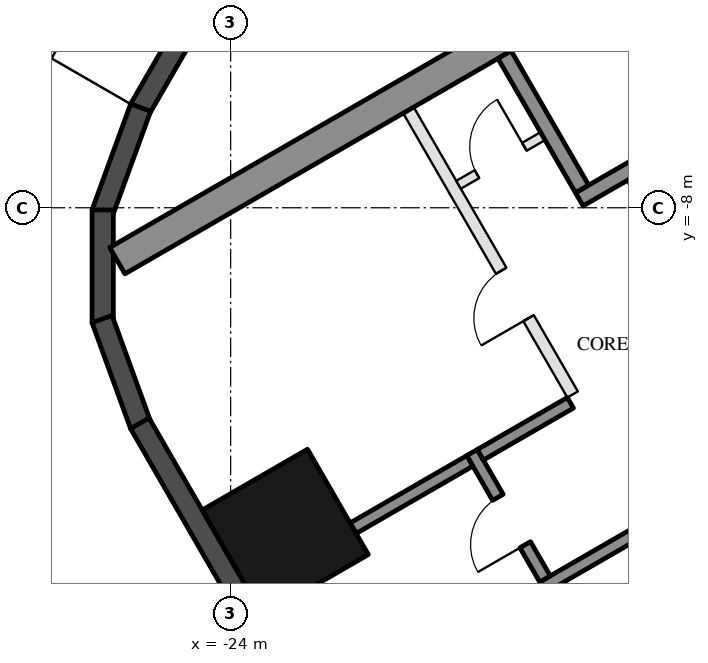
"""IFC4 building model, lengths in metres.
Left out: names, types, materials, properties, quantities, classifications, styles, units other than length and angle.
Written with IfcOpenShell. Run it as: python <this file> out.ifc"""

import sys

from ifc_helpers import new_model, si_unit, direction, frame, frame_2d, origin, origin_2d, place, context, subcontext, project, spatial, rectangle, hollow_rectangle, extrude, boolean, halfspace, element, fill, save


model = new_model("IFC4")
c1 = context("Model", 3, precision=1e-05, world=origin(), true_north=direction((0.0, 1.0)))
c2 = subcontext(c1, "Body", "Model", "MODEL_VIEW")
j1 = project(units=[si_unit("LENGTHUNIT", "METRE"), si_unit("PLANEANGLEUNIT", "RADIAN")], contexts=[c1])
p1 = place(None, origin())
s1 = spatial("IfcSite", under=j1, at=p1, CompositionType="ELEMENT")
p2 = place(p1, origin())
s2 = spatial("IfcBuilding", under=s1, at=p2, CompositionType="ELEMENT")
p3 = place(p2, frame((0.0, 0.0, 257.8)))
s3 = spatial("IfcBuildingStorey", under=s2, at=p3, CompositionType="ELEMENT", Elevation=257.8)
p4 = place(p3, frame((-23.102, -13.338, 0.0), z_axis=(0.0, 0.0, 1.0), x_axis=(-0.5, 0.866025403784, 0.0)))
e1 = element("IfcColumn", 1, at=p4, inside=s3, PredefinedType="COLUMN", context=c2, shape_type="SweptSolid", body=[
    boolean("DIFFERENCE", extrude(hollow_rectangle(XDim=2.0, YDim=2.0, WallThickness=0.05, at=origin_2d()), origin(), (0.0, 0.0, 1.0), 3.7), halfspace(frame((0.0, 0.0, 0.112), z_axis=(0.0, 0.0, 1.0), x_axis=(1.0, 0.0, 0.0)), True)),
])
p5 = place(p3, frame((-23.579, -3.065, 0.0), z_axis=(0.0, 0.0, 1.0), x_axis=(-0.500048109927, -0.865997625723, 0.0)))
e2 = element("IfcWall", 2, at=p5, inside=s3, PredefinedType="SOLIDWALL", context=c2, shape_type="SweptSolid", body=[
    extrude(rectangle(XDim=3.829, YDim=0.35, at=frame_2d((1.914, 0.0))), origin(), (0.0, 0.0, 1.0), 3.55),
])
p6 = place(p5, frame((1.575, 0.0, 0.3)))
e3 = element("IfcOpeningElement", 3, at=p6, cuts=e2, PredefinedType="OPENING", context=c2, shape_type="SweptSolid", body=[
    extrude(rectangle(XDim=0.8, YDim=2.65, at=frame_2d((0.4, 1.325))), frame((0.0, 0.185, 0.0), z_axis=(0.0, -1.0, 0.0), x_axis=(1.0, 0.0, 0.0)), (0.0, 0.0, 1.0), 0.37),
])
for number, where, z_axis, x_axis in (
    (4, (-25.481, -6.353, 0.0), (0.0, 0.0, 1.0), (-0.342, -0.94, 0.0)),
    (5, (-26.104, -8.036, 0.0), (0.0, 0.0, 1.0), (0.0, -1.0, 0.0)),
):
    element("IfcWall", number, at=place(p3, frame(where, z_axis=z_axis, x_axis=x_axis)), inside=s3, PredefinedType="SOLIDWALL", context=c2, shape_type="SweptSolid", body=[
        extrude(rectangle(XDim=1.855, YDim=0.35, at=frame_2d((0.927, 0.0))), origin(), (0.0, 0.0, 1.0), 3.55),
    ])
p7 = place(p3, frame((-26.115, -9.831, 0.0), z_axis=(0.0, 0.0, 1.0), x_axis=(0.341890986265, -0.93973962006, 0.0)))
e6 = element("IfcWall", 6, at=p7, inside=s3, PredefinedType="SOLIDWALL", context=c2, shape_type="SweptSolid", body=[
    extrude(rectangle(XDim=1.855, YDim=0.35, at=frame_2d((0.928, 0.0))), origin(), (0.0, 0.0, 1.0), 3.55),
])
p8 = place(p3, frame((-25.494, -11.546, 0.0), z_axis=(0.0, 0.0, 1.0), x_axis=(0.500028854569, -0.86600874395, 0.0)))
e7 = element("IfcWall", 7, at=p8, inside=s3, PredefinedType="SOLIDWALL", context=c2, shape_type="SweptSolid", body=[
    extrude(rectangle(XDim=5.495, YDim=0.35, at=frame_2d((2.748, 0.0))), origin(), (0.0, 0.0, 1.0), 3.55),
])
for number, where, z_axis, x_axis in (
    (8, (-13.797, -1.903, 0.0), (0.0, 0.0, 1.0), (-0.866, -0.5, 0.0)),
    (9, (-8.547, -10.997, 0.0), (0.0, 0.0, 1.0), (-0.866, -0.5, 0.0)),
):
    element("IfcWall", number, at=place(p3, frame(where, z_axis=z_axis, x_axis=x_axis)), inside=s3, PredefinedType="SHEAR", context=c2, shape_type="SweptSolid", body=[
        extrude(rectangle(XDim=13.934, YDim=0.5, at=frame_2d((6.967, 0.0))), origin(), (0.0, 0.0, 1.0), 3.5),
    ])
p9 = place(p3, frame((-12.681, -4.636, 0.0), z_axis=(0.0, 0.0, 1.0), x_axis=(-0.866021702275, -0.500006411147, 0.0)))
e10 = element("IfcWall", 10, at=p9, inside=s3, PredefinedType="SHEAR", context=c2, shape_type="SweptSolid", body=[
    extrude(rectangle(XDim=6.45, YDim=0.25, at=frame_2d((3.225, 0.0))), origin(), (0.0, 0.0, 1.0), 3.5),
])
p10 = place(p9, frame((0.3, 0.0, 0.0)))
e11 = element("IfcOpeningElement", 11, at=p10, cuts=e10, PredefinedType="OPENING", context=c2, shape_type="SweptSolid", body=[
    extrude(rectangle(XDim=1.0, YDim=2.1, at=frame_2d((0.5, 1.05))), frame((0.0, 0.135, 0.0), z_axis=(0.0, -1.0, 0.0), x_axis=(1.0, 0.0, 0.0)), (0.0, 0.0, 1.0), 0.27),
])
p11 = place(p3, frame((-19.496, -5.482, 0.0), z_axis=(0.0, 0.0, 1.0), x_axis=(0.499990435942, -0.866030925526, 0.0)))
e12 = element("IfcWall", 12, at=p11, inside=s3, PredefinedType="SHEAR", context=c2, shape_type="SweptSolid", body=[
    extrude(rectangle(XDim=2.55, YDim=0.25, at=frame_2d((1.275, 0.0))), origin(), (0.0, 0.0, 1.0), 3.5),
])
p12 = place(p3, frame((-17.381, -7.495, 0.0), z_axis=(0.0, 0.0, 1.0), x_axis=(0.500011755427, -0.866018616679, 0.0)))
e13 = element("IfcWall", 13, at=p12, inside=s3, PredefinedType="SHEAR", context=c2, shape_type="SweptSolid", body=[
    extrude(rectangle(XDim=2.8, YDim=0.2, at=frame_2d((1.4, 0.0))), origin(), (0.0, 0.0, 1.0), 3.5),
])
p13 = place(p3, frame((-10.068, -9.162, 0.0), z_axis=(0.0, 0.0, 1.0), x_axis=(-0.866032725843, -0.499987317609, 0.0)))
e14 = element("IfcWall", 14, at=p13, inside=s3, PredefinedType="SHEAR", context=c2, shape_type="SweptSolid", body=[
    extrude(rectangle(XDim=10.16, YDim=0.2, at=frame_2d((5.08, 0.0))), origin(), (0.0, 0.0, 1.0), 3.5),
])
p14 = place(p13, frame((4.53, 0.0, 0.0)))
e15 = element("IfcOpeningElement", 15, at=p14, cuts=e14, PredefinedType="OPENING", context=c2, shape_type="SweptSolid", body=[
    extrude(rectangle(XDim=0.9, YDim=2.1, at=frame_2d((0.45, 1.05))), frame((0.0, 0.11, 0.0), z_axis=(0.0, -1.0, 0.0), x_axis=(1.0, 0.0, 0.0)), (0.0, 0.0, 1.0), 0.22),
])
p15 = place(p3, frame((-20.031, -12.026, 0.0), z_axis=(0.0, 0.0, 1.0), x_axis=(0.500033551112, -0.866006032174, 0.0)))
e16 = element("IfcWall", 16, at=p15, inside=s3, PredefinedType="SHEAR", context=c2, shape_type="SweptSolid", body=[
    extrude(rectangle(XDim=2.4, YDim=0.2, at=frame_2d((1.2, 0.0))), origin(), (0.0, 0.0, 1.0), 3.5),
])
p16 = place(p15, frame((0.85, 0.0, 0.0)))
e17 = element("IfcOpeningElement", 17, at=p16, cuts=e16, PredefinedType="OPENING", context=c2, shape_type="SweptSolid", body=[
    extrude(rectangle(XDim=0.9, YDim=2.1, at=frame_2d((0.45, 1.05))), frame((0.0, 0.11, 0.0), z_axis=(0.0, -1.0, 0.0), x_axis=(1.0, 0.0, 0.0)), (0.0, 0.0, 1.0), 0.22),
])
p17 = place(p3, frame((-18.413, -11.208, 0.0), z_axis=(0.0, 0.0, 1.0), x_axis=(-0.866038183914, -0.499977863513, 0.0)))
e18 = element("IfcWall", 18, at=p17, inside=s3, PredefinedType="SHEAR", context=c2, shape_type="SweptSolid", body=[
    extrude(rectangle(XDim=1.71, YDim=0.2, at=frame_2d((0.855, 0.0))), origin(), (0.0, 0.0, 1.0), 3.5),
])
p18 = place(p3, frame((-20.067, -12.163, 0.0), z_axis=(0.0, 0.0, 1.0), x_axis=(-0.866079196458, -0.49990681678, 0.0)))
e19 = element("IfcWall", 19, at=p18, inside=s3, PredefinedType="SHEAR", context=c2, shape_type="SweptSolid", body=[
    extrude(rectangle(XDim=2.216, YDim=0.2, at=frame_2d((1.108, 0.0))), origin(), (0.0, 0.0, 1.0), 3.5),
])
p19 = place(p3, frame((-21.076, -6.395, 0.0), z_axis=(0.0, 0.0, 1.0), x_axis=(0.50001468107, -0.866016927499, 0.0)))
e20 = element("IfcWall", 20, at=p19, inside=s3, PredefinedType="PARTITIONING", context=c2, shape_type="SweptSolid", body=[
    extrude(rectangle(XDim=5.4, YDim=0.2, at=frame_2d((2.7, 0.0))), origin(), (0.0, 0.0, 1.0), 3.5),
])
p20 = place(p19, frame((3.05, 0.0, 0.0)))
e21 = element("IfcOpeningElement", 21, at=p20, cuts=e20, PredefinedType="OPENING", context=c2, shape_type="SweptSolid", body=[
    extrude(rectangle(XDim=0.9, YDim=2.1, at=frame_2d((0.45, 1.05))), frame((0.0, 0.11, 0.0), z_axis=(0.0, -1.0, 0.0), x_axis=(1.0, 0.0, 0.0)), (0.0, 0.0, 1.0), 0.22),
])
p21 = place(p3, frame((-18.866, -6.822, 0.0), z_axis=(0.0, 0.0, 1.0), x_axis=(-0.866028054938, -0.499995408039, 0.0)))
e22 = element("IfcWall", 22, at=p21, inside=s3, PredefinedType="PARTITIONING", context=c2, shape_type="SweptSolid", body=[
    extrude(rectangle(XDim=1.6, YDim=0.15, at=frame_2d((0.8, 0.0))), origin(), (0.0, 0.0, 1.0), 3.5),
])
p22 = place(p21, frame((0.35, 0.0, 0.0)))
e23 = element("IfcOpeningElement", 23, at=p22, cuts=e22, PredefinedType="OPENING", context=c2, shape_type="SweptSolid", body=[
    extrude(rectangle(XDim=0.9, YDim=2.1, at=frame_2d((0.45, 1.05))), frame((0.0, 0.085, 0.0), z_axis=(0.0, -1.0, 0.0), x_axis=(1.0, 0.0, 0.0)), (0.0, 0.0, 1.0), 0.17),
])
p23 = place(p22, frame((0.9, 0.0, 0.0), z_axis=(0.0, 0.0, 1.0), x_axis=(-1.0, 0.0, 0.0)))
e24 = element("IfcDoor", 24, at=p23, inside=s3, OperationType="SINGLE_SWING_RIGHT", PredefinedType="DOOR", context=c2, shape_type="SweptSolid", body=[
    extrude(rectangle(XDim=0.9, YDim=2.1, at=frame_2d((0.45, 1.05))), frame((0.0, 0.025, 0.0), z_axis=(0.0, -1.0, 0.0), x_axis=(1.0, 0.0, 0.0)), (0.0, 0.0, 1.0), 0.05),
])
fill(e23, e24)
p24 = place(p16, frame((0.9, 0.0, 0.0), z_axis=(0.0, 0.0, 1.0), x_axis=(-1.0, 0.0, 0.0)))
e25 = element("IfcDoor", 25, at=p24, inside=s3, OperationType="SINGLE_SWING_LEFT", PredefinedType="DOOR", context=c2, shape_type="SweptSolid", body=[
    extrude(rectangle(XDim=0.9, YDim=2.1, at=frame_2d((0.45, 1.05))), frame((0.0, 0.025, 0.0), z_axis=(0.0, -1.0, 0.0), x_axis=(1.0, 0.0, 0.0)), (0.0, 0.0, 1.0), 0.05),
])
fill(e17, e25)
p25 = place(p20, frame((0.9, 0.0, 0.0), z_axis=(0.0, 0.0, 1.0), x_axis=(-1.0, 0.0, 0.0)))
e26 = element("IfcDoor", 26, at=p25, inside=s3, OperationType="SINGLE_SWING_LEFT", PredefinedType="DOOR", context=c2, shape_type="SweptSolid", body=[
    extrude(rectangle(XDim=0.9, YDim=2.1, at=frame_2d((0.45, 1.05))), frame((0.0, 0.025, 0.0), z_axis=(0.0, -1.0, 0.0), x_axis=(1.0, 0.0, 0.0)), (0.0, 0.0, 1.0), 0.05),
])
fill(e21, e26)
save(model, sys.argv[1])
